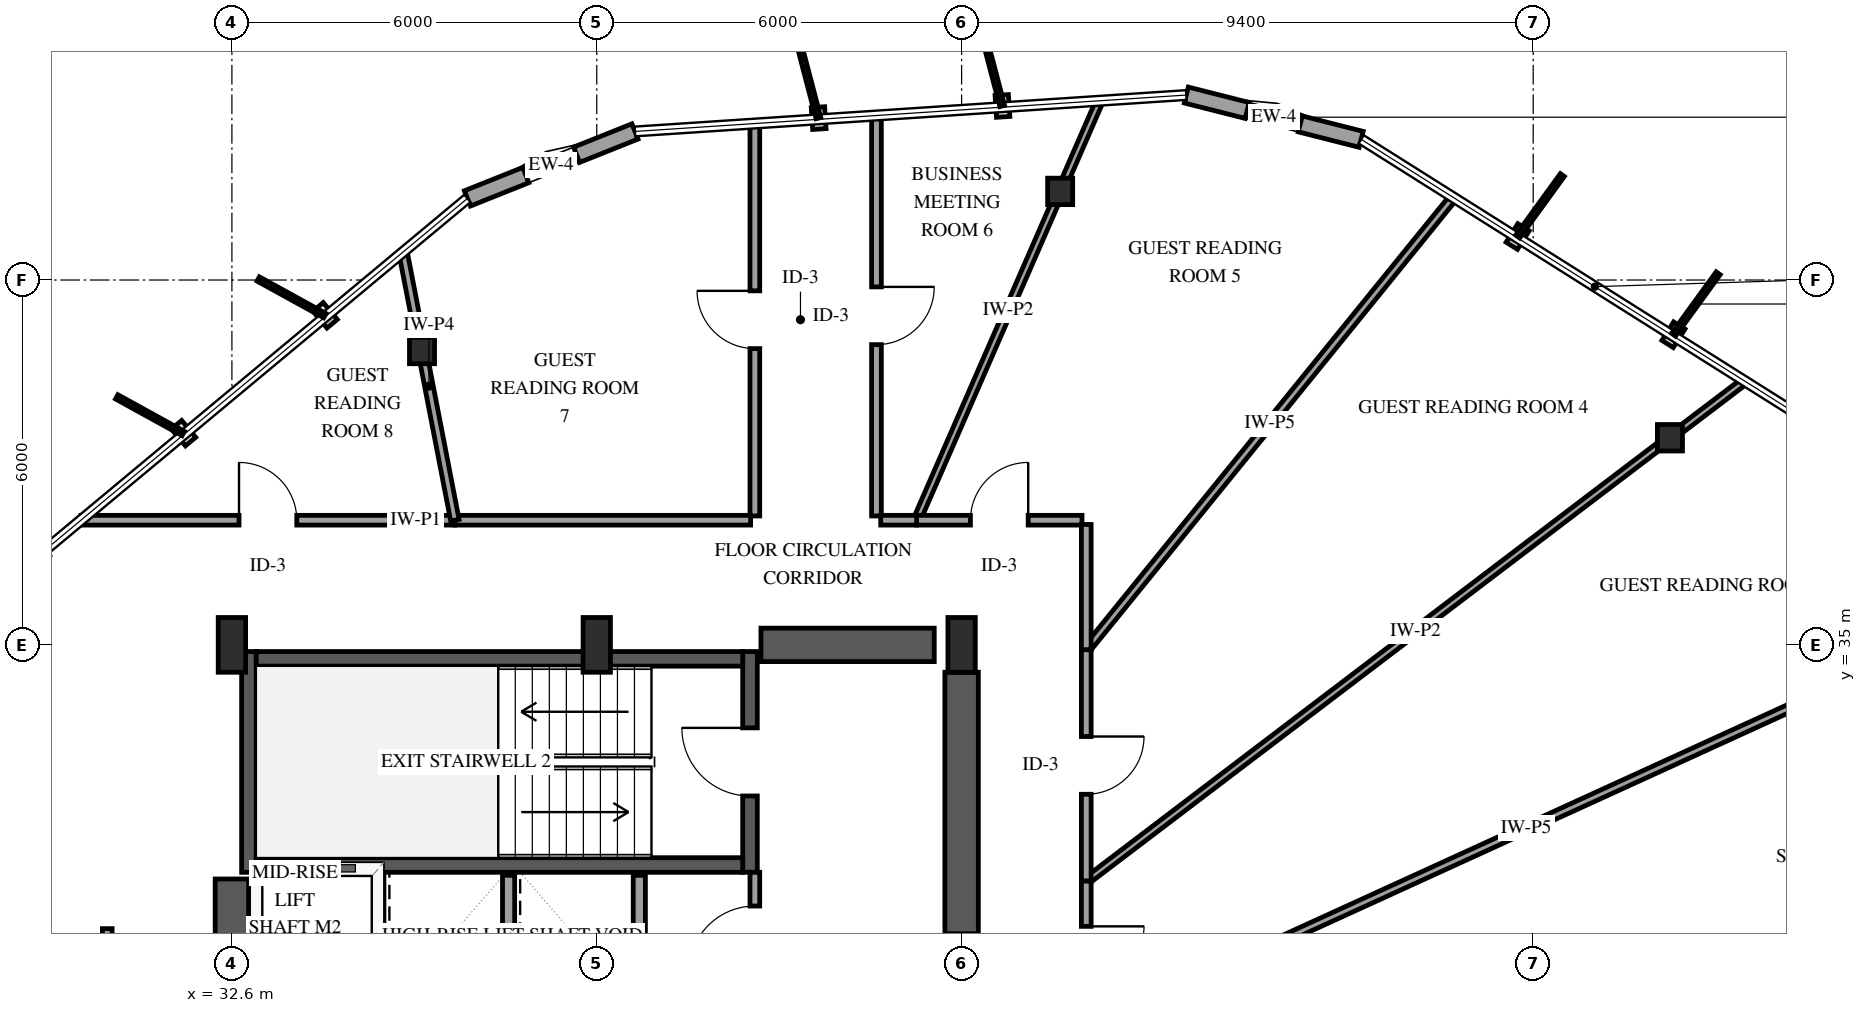
"""IFC4 building model, lengths in metres.
Left out: names, types, materials, properties, quantities, classifications, styles, units other than length and angle.
Written with IfcOpenShell. Run it as: python <this file> out.ifc"""

import sys

from ifc_helpers import new_model, si_unit, direction, frame, frame_2d, origin, origin_2d, place, context, subcontext, project, spatial, rectangle, i_section, extrude, element, fill, save


model = new_model("IFC4")
c1 = context("Model", 3, precision=1e-05, world=origin(), true_north=direction((0.0, 1.0)))
c2 = subcontext(c1, "Body", "Model", "MODEL_VIEW")
j1 = project(units=[si_unit("LENGTHUNIT", "METRE"), si_unit("PLANEANGLEUNIT", "RADIAN")], contexts=[c1])
p1 = place(None, origin())
s1 = spatial("IfcSite", under=j1, at=p1, CompositionType="ELEMENT")
p2 = place(p1, origin())
s2 = spatial("IfcBuilding", under=s1, at=p2, CompositionType="ELEMENT")
p3 = place(p2, frame((0.0, 0.0, 178.6)))
s3 = spatial("IfcBuildingStorey", under=s2, at=p3, CompositionType="ELEMENT", Elevation=178.6)
p4 = place(p3, frame((32.88, 31.26, 0.0), z_axis=(0.0, 0.0, 1.0), x_axis=(0.0, 1.0, 0.0)))
e1 = element("IfcWall", 1, at=p4, inside=s3, PredefinedType="SHEAR", context=c2, shape_type="SweptSolid", body=[
    extrude(rectangle(XDim=3.63, YDim=0.24, at=frame_2d((1.815, 0.0))), origin(), (0.0, 0.0, 1.0), 3.6),
])
p5 = place(p3, frame((41.12, 31.26, 0.0), z_axis=(0.0, 0.0, 1.0), x_axis=(0.0, 1.0, 0.0)))
e2 = element("IfcWall", 2, at=p5, inside=s3, PredefinedType="SHEAR", context=c2, shape_type="SweptSolid", body=[
    extrude(rectangle(XDim=3.63, YDim=0.24, at=frame_2d((1.815, 0.0))), origin(), (0.0, 0.0, 1.0), 3.6),
])
p6 = place(p5, frame((1.255, 0.0, 0.0)))
e3 = element("IfcOpeningElement", 3, at=p6, cuts=e2, PredefinedType="OPENING", context=c2, shape_type="SweptSolid", body=[
    extrude(rectangle(XDim=1.12, YDim=2.15, at=frame_2d((0.56, 1.075))), frame((0.0, 0.13, 0.0), z_axis=(0.0, -1.0, 0.0), x_axis=(1.0, 0.0, 0.0)), (0.0, 0.0, 1.0), 0.26),
])
for number, where, z_axis, x_axis in (
    (4, (33.0, 31.38, 0.0), (0.0, 0.0, 1.0), (1.0, 0.0, 0.0)),
    (5, (33.0, 34.77, 0.0), (0.0, 0.0, 1.0), (1.0, 0.0, 0.0)),
):
    element("IfcWall", number, at=place(p3, frame(where, z_axis=z_axis, x_axis=x_axis)), inside=s3, PredefinedType="SHEAR", context=c2, shape_type="SweptSolid", body=[
        extrude(rectangle(XDim=8.0, YDim=0.24, at=frame_2d((4.0, 0.0))), origin(), (0.0, 0.0, 1.0), 3.6),
    ])
p7 = place(p3, frame((32.6, 18.85, 0.0), z_axis=(0.0, 0.0, 1.0), x_axis=(0.0, 1.0, 0.0)))
e6 = element("IfcWall", 6, at=p7, inside=s3, PredefinedType="SHEAR", context=c2, shape_type="SweptSolid", body=[
    extrude(rectangle(XDim=12.3, YDim=0.55, at=frame_2d((6.15, 0.0))), origin(), (0.0, 0.0, 1.0), 3.6),
])
p8 = place(p3, frame((41.3, 35.0, 0.0), z_axis=(0.0, 0.0, 1.0), x_axis=(1.0, 0.0, 0.0)))
e7 = element("IfcWall", 7, at=p8, inside=s3, PredefinedType="SHEAR", context=c2, shape_type="SweptSolid", body=[
    extrude(rectangle(XDim=2.85, YDim=0.55, at=frame_2d((1.425, 0.0))), origin(), (0.0, 0.0, 1.0), 3.6),
])
p9 = place(p3, frame((44.6, 29.8, 0.0), z_axis=(0.0, 0.0, 1.0), x_axis=(0.0, 1.0, 0.0)))
e8 = element("IfcWall", 8, at=p9, inside=s3, PredefinedType="SHEAR", context=c2, shape_type="SweptSolid", body=[
    extrude(rectangle(XDim=4.75, YDim=0.55, at=frame_2d((2.375, 0.0))), origin(), (0.0, 0.0, 1.0), 3.6),
])
for number, where, z_axis, x_axis in (
    (9, (32.6, 35.0, 0.0), (0.0, 0.0, 1.0), (1.0, 0.0, 0.0)),
    (10, (38.6, 35.0, 0.0), (0.0, 0.0, 1.0), (1.0, 0.0, 0.0)),
    (11, (44.6, 35.0, 0.0), (0.0, 0.0, 1.0), (1.0, 0.0, 0.0)),
):
    element("IfcColumn", number, at=place(p3, frame(where, z_axis=z_axis, x_axis=x_axis)), inside=s3, PredefinedType="PILASTER", context=c2, shape_type="SweptSolid", body=[
        extrude(rectangle(XDim=0.45, YDim=0.9, at=origin_2d()), origin(), (0.0, 0.0, 1.0), 3.6),
    ])
for number, where, z_axis, x_axis in (
    (12, (56.249, 38.406, 0.0), (0.0, 0.0, 1.0), (1.0, 0.0, 0.0)),
    (13, (46.221, 42.458, 0.0), (0.0, 0.0, 1.0), (1.0, 0.0, 0.0)),
    (14, (35.726, 39.841, 0.0), (0.0, 0.0, 1.0), (1.0, 0.0, 0.0)),
):
    element("IfcColumn", number, at=place(p3, frame(where, z_axis=z_axis, x_axis=x_axis)), inside=s3, PredefinedType="COLUMN", context=c2, shape_type="SweptSolid", body=[
        extrude(i_section(OverallWidth=0.412, OverallDepth=0.435, WebThickness=0.036, FlangeThickness=0.057, FilletRadius=0.038, at=origin_2d()), origin(), (0.0, 0.0, 1.0), 3.6),
    ])
p10 = place(p3, frame((51.171, 43.313, 0.0), z_axis=(0.0, 0.0, 1.0), x_axis=(-0.969353138007, 0.245671516128, 0.0)))
e15 = element("IfcWall", 15, at=p10, inside=s3, PredefinedType="SOLIDWALL", context=c2, shape_type="SweptSolid", body=[
    extrude(rectangle(XDim=2.966, YDim=0.27, at=frame_2d((1.483, 0.0))), origin(), (0.0, 0.0, 1.0), 2.679),
])
p11 = place(p10, frame((1.033, 0.0, 0.75)))
e16 = element("IfcOpeningElement", 16, at=p11, cuts=e15, PredefinedType="OPENING", context=c2, shape_type="SweptSolid", body=[
    extrude(rectangle(XDim=0.9, YDim=1.5, at=frame_2d((0.45, 0.75))), frame((0.0, 0.145, 0.0), z_axis=(0.0, -1.0, 0.0), x_axis=(1.0, 0.0, 0.0)), (0.0, 0.0, 1.0), 0.29),
])
p12 = place(p3, frame((39.228, 43.443, 0.0), z_axis=(0.0, 0.0, 1.0), x_axis=(-0.928595836805, -0.371092672884, 0.0)))
e17 = element("IfcWall", 17, at=p12, inside=s3, PredefinedType="SOLIDWALL", context=c2, shape_type="SweptSolid", body=[
    extrude(rectangle(XDim=2.967, YDim=0.27, at=frame_2d((1.483, 0.0))), origin(), (0.0, 0.0, 1.0), 2.679),
])
p13 = place(p12, frame((1.033, 0.0, 0.75)))
e18 = element("IfcOpeningElement", 18, at=p13, cuts=e17, PredefinedType="OPENING", context=c2, shape_type="SweptSolid", body=[
    extrude(rectangle(XDim=0.9, YDim=1.5, at=frame_2d((0.45, 0.75))), frame((0.0, 0.145, 0.0), z_axis=(0.0, -1.0, 0.0), x_axis=(1.0, 0.0, 0.0)), (0.0, 0.0, 1.0), 0.29),
])
for number, where, z_axis, x_axis in (
    (19, (35.0, 29.11, 0.0), (0.0, 0.0, 1.0), (0.0, 1.0, 0.0)),
    (20, (37.15, 29.11, 0.0), (0.0, 0.0, 1.0), (0.0, 1.0, 0.0)),
    (21, (39.3, 29.11, 0.0), (0.0, 0.0, 1.0), (0.0, 1.0, 0.0)),
):
    element("IfcWall", number, at=place(p3, frame(where, z_axis=z_axis, x_axis=x_axis)), inside=s3, PredefinedType="SOLIDWALL", context=c2, shape_type="SweptSolid", body=[
        extrude(rectangle(XDim=2.1, YDim=0.2, at=frame_2d((1.05, 0.0))), origin(), (0.0, 0.0, 1.0), 3.3),
    ])
p14 = place(p3, frame((46.65, 28.677, 0.0), z_axis=(0.0, 0.0, 1.0), x_axis=(0.909584224625, 0.415519600395, 0.0)))
e22 = element("IfcWall", 22, at=p14, inside=s3, PredefinedType="PARTITIONING", context=c2, shape_type="SweptSolid", body=[
    extrude(rectangle(XDim=15.905, YDim=0.13, at=frame_2d((7.953, 0.0))), origin(), (0.0, 0.0, 1.0), 3.3),
])
p15 = place(p3, frame((46.65, 31.115, 0.0), z_axis=(0.0, 0.0, 1.0), x_axis=(0.796322023961, 0.60487290744, 0.0)))
e23 = element("IfcWall", 23, at=p15, inside=s3, PredefinedType="PARTITIONING", context=c2, shape_type="SweptSolid", body=[
    extrude(rectangle(XDim=13.596, YDim=0.12, at=frame_2d((6.798, 0.0))), origin(), (0.0, 0.0, 1.0), 3.3),
])
p16 = place(p3, frame((46.65, 34.921, 0.0), z_axis=(0.0, 0.0, 1.0), x_axis=(0.630137710879, 0.776483396685, 0.0)))
e24 = element("IfcWall", 24, at=p16, inside=s3, PredefinedType="PARTITIONING", context=c2, shape_type="SweptSolid", body=[
    extrude(rectangle(XDim=9.579, YDim=0.13, at=frame_2d((4.79, 0.0))), origin(), (0.0, 0.0, 1.0), 3.3),
])
p17 = place(p3, frame((43.86, 37.05, 0.0), z_axis=(0.0, 0.0, 1.0), x_axis=(0.400052953887, 0.916492026199, 0.0)))
e25 = element("IfcWall", 25, at=p17, inside=s3, PredefinedType="PARTITIONING", context=c2, shape_type="SweptSolid", body=[
    extrude(rectangle(XDim=7.526, YDim=0.12, at=frame_2d((3.763, 0.0))), origin(), (0.0, 0.0, 1.0), 2.595),
])
p18 = place(p3, frame((43.2, 43.705, 0.0), z_axis=(0.0, 0.0, 1.0), x_axis=(0.0, -1.0, 0.0)))
e26 = element("IfcWall", 26, at=p18, inside=s3, PredefinedType="PARTITIONING", context=c2, shape_type="SweptSolid", body=[
    extrude(rectangle(XDim=6.585, YDim=0.16, at=frame_2d((3.292, 0.0))), origin(), (0.0, 0.0, 1.0), 3.3),
])
p19 = place(p18, frame((2.818, 0.0, 0.0)))
e27 = element("IfcOpeningElement", 27, at=p19, cuts=e26, PredefinedType="OPENING", context=c2, shape_type="SweptSolid", body=[
    extrude(rectangle(XDim=0.95, YDim=2.15, at=frame_2d((0.475, 1.075))), frame((0.0, 0.09, 0.0), z_axis=(0.0, -1.0, 0.0), x_axis=(1.0, 0.0, 0.0)), (0.0, 0.0, 1.0), 0.18),
])
p20 = place(p3, frame((41.2, 37.12, 0.0), z_axis=(0.0, 0.0, 1.0), x_axis=(0.0, 1.0, 0.0)))
e28 = element("IfcWall", 28, at=p20, inside=s3, PredefinedType="PARTITIONING", context=c2, shape_type="SweptSolid", body=[
    extrude(rectangle(XDim=6.453, YDim=0.16, at=frame_2d((3.227, 0.0))), origin(), (0.0, 0.0, 1.0), 3.3),
])
p21 = place(p20, frame((2.752, 0.0, 0.0)))
e29 = element("IfcOpeningElement", 29, at=p21, cuts=e28, PredefinedType="OPENING", context=c2, shape_type="SweptSolid", body=[
    extrude(rectangle(XDim=0.95, YDim=2.15, at=frame_2d((0.475, 1.075))), frame((0.0, 0.09, 0.0), z_axis=(0.0, -1.0, 0.0), x_axis=(1.0, 0.0, 0.0)), (0.0, 0.0, 1.0), 0.18),
])
p22 = place(p3, frame((30.117, 37.05, 0.0), z_axis=(0.0, 0.0, 1.0), x_axis=(1.0, 0.0, 0.0)))
e30 = element("IfcWall", 30, at=p22, inside=s3, PredefinedType="PARTITIONING", context=c2, shape_type="SweptSolid", body=[
    extrude(rectangle(XDim=6.15, YDim=0.16, at=frame_2d((3.075, 0.0))), origin(), (0.0, 0.0, 1.0), 3.3),
])
p23 = place(p22, frame((2.6, 0.0, 0.0)))
e31 = element("IfcOpeningElement", 31, at=p23, cuts=e30, PredefinedType="OPENING", context=c2, shape_type="SweptSolid", body=[
    extrude(rectangle(XDim=0.95, YDim=2.15, at=frame_2d((0.475, 1.075))), frame((0.0, 0.09, 0.0), z_axis=(0.0, -1.0, 0.0), x_axis=(1.0, 0.0, 0.0)), (0.0, 0.0, 1.0), 0.18),
])
p24 = place(p3, frame((36.267, 37.05, 0.0), z_axis=(0.0, 0.0, 1.0), x_axis=(1.0, 0.0, 0.0)))
e32 = element("IfcWall", 32, at=p24, inside=s3, PredefinedType="PARTITIONING", context=c2, shape_type="SweptSolid", body=[
    extrude(rectangle(XDim=4.863, YDim=0.16, at=frame_2d((2.431, 0.0))), origin(), (0.0, 0.0, 1.0), 3.3),
])
p25 = place(p3, frame((36.267, 37.05, 0.0), z_axis=(0.0, 0.0, 1.0), x_axis=(-0.190163893375, 0.98175235862, 0.0)))
e33 = element("IfcWall", 33, at=p25, inside=s3, PredefinedType="PARTITIONING", context=c2, shape_type="SweptSolid", body=[
    extrude(rectangle(XDim=4.491, YDim=0.14, at=frame_2d((2.246, 0.0))), origin(), (0.0, 0.0, 1.0), 2.595),
])
p26 = place(p3, frame((46.65, 34.921, 0.0), z_axis=(0.0, 0.0, 1.0), x_axis=(0.0, -1.0, 0.0)))
e34 = element("IfcWall", 34, at=p26, inside=s3, PredefinedType="PARTITIONING", context=c2, shape_type="SweptSolid", body=[
    extrude(rectangle(XDim=3.806, YDim=0.16, at=frame_2d((1.903, 0.0))), origin(), (0.0, 0.0, 1.0), 3.3),
])
p27 = place(p26, frame((1.428, 0.0, 0.0)))
e35 = element("IfcOpeningElement", 35, at=p27, cuts=e34, PredefinedType="OPENING", context=c2, shape_type="SweptSolid", body=[
    extrude(rectangle(XDim=0.95, YDim=2.15, at=frame_2d((0.475, 1.075))), frame((0.0, 0.09, 0.0), z_axis=(0.0, -1.0, 0.0), x_axis=(1.0, 0.0, 0.0)), (0.0, 0.0, 1.0), 0.18),
])
p28 = place(p3, frame((43.86, 37.05, 0.0), z_axis=(0.0, 0.0, 1.0), x_axis=(1.0, 0.0, 0.0)))
e36 = element("IfcWall", 36, at=p28, inside=s3, PredefinedType="PARTITIONING", context=c2, shape_type="SweptSolid", body=[
    extrude(rectangle(XDim=2.72, YDim=0.16, at=frame_2d((1.36, 0.0))), origin(), (0.0, 0.0, 1.0), 3.3),
])
p29 = place(p28, frame((0.885, 0.0, 0.0)))
e37 = element("IfcOpeningElement", 37, at=p29, cuts=e36, PredefinedType="OPENING", context=c2, shape_type="SweptSolid", body=[
    extrude(rectangle(XDim=0.95, YDim=2.15, at=frame_2d((0.475, 1.075))), frame((0.0, 0.09, 0.0), z_axis=(0.0, -1.0, 0.0), x_axis=(1.0, 0.0, 0.0)), (0.0, 0.0, 1.0), 0.18),
])
p30 = place(p3, frame((46.65, 31.115, 0.0), z_axis=(0.0, 0.0, 1.0), x_axis=(0.0, -1.0, 0.0)))
e38 = element("IfcWall", 38, at=p30, inside=s3, PredefinedType="PARTITIONING", context=c2, shape_type="SweptSolid", body=[
    extrude(rectangle(XDim=2.438, YDim=0.16, at=frame_2d((1.219, 0.0))), origin(), (0.0, 0.0, 1.0), 3.3),
])
p31 = place(p30, frame((0.744, 0.0, 0.0)))
e39 = element("IfcOpeningElement", 39, at=p31, cuts=e38, PredefinedType="OPENING", context=c2, shape_type="SweptSolid", body=[
    extrude(rectangle(XDim=0.95, YDim=2.15, at=frame_2d((0.475, 1.075))), frame((0.0, 0.09, 0.0), z_axis=(0.0, -1.0, 0.0), x_axis=(1.0, 0.0, 0.0)), (0.0, 0.0, 1.0), 0.18),
])
p32 = place(p3, frame((41.2, 29.07, 0.0), z_axis=(0.0, 0.0, 1.0), x_axis=(0.0, 1.0, 0.0)))
e40 = element("IfcWall", 40, at=p32, inside=s3, PredefinedType="PARTITIONING", context=c2, shape_type="SweptSolid", body=[
    extrude(rectangle(XDim=2.19, YDim=0.16, at=frame_2d((1.095, 0.0))), origin(), (0.0, 0.0, 1.0), 3.3),
])
p33 = place(p32, frame((0.555, 0.0, 0.0)))
e41 = element("IfcOpeningElement", 41, at=p33, cuts=e40, PredefinedType="OPENING", context=c2, shape_type="SweptSolid", body=[
    extrude(rectangle(XDim=1.08, YDim=2.15, at=frame_2d((0.54, 1.075))), frame((0.0, 0.09, 0.0), z_axis=(0.0, -1.0, 0.0), x_axis=(1.0, 0.0, 0.0)), (0.0, 0.0, 1.0), 0.18),
])
p34 = place(p3, frame((46.65, 36.98, 0.0), z_axis=(0.0, 0.0, 1.0), x_axis=(0.0, -1.0, 0.0)))
e42 = element("IfcWall", 42, at=p34, inside=s3, PredefinedType="PARTITIONING", context=c2, shape_type="SweptSolid", body=[
    extrude(rectangle(XDim=2.059, YDim=0.16, at=frame_2d((1.03, 0.0))), origin(), (0.0, 0.0, 1.0), 3.3),
])
p35 = place(p3, frame((43.27, 37.05, 0.0), z_axis=(0.0, 0.0, 1.0), x_axis=(1.0, 0.0, 0.0)))
e43 = element("IfcWall", 43, at=p35, inside=s3, PredefinedType="PARTITIONING", context=c2, shape_type="SweptSolid", body=[
    extrude(rectangle(XDim=0.59, YDim=0.16, at=frame_2d((0.295, 0.0))), origin(), (0.0, 0.0, 1.0), 3.3),
])
p36 = place(p3, frame((30.55, 21.778, 0.0), z_axis=(0.0, 0.0, 1.0), x_axis=(0.0, 1.0, 0.0)))
e44 = element("IfcWall", 44, at=p36, inside=s3, PredefinedType="PARTITIONING", context=c2, shape_type="SweptSolid", body=[
    extrude(rectangle(XDim=8.555, YDim=0.16, at=frame_2d((4.277, 0.0))), origin(), (0.0, 0.0, 1.0), 3.3),
])
p37 = place(p11, origin())
e45 = element("IfcWindow", 45, at=p37, inside=s3, PartitioningType="SINGLE_PANEL", PredefinedType="WINDOW", context=c2, shape_type="SweptSolid", body=[
    extrude(rectangle(XDim=0.9, YDim=1.5, at=frame_2d((0.45, 0.75))), frame((0.0, 0.03, 0.0), z_axis=(0.0, -1.0, 0.0), x_axis=(1.0, 0.0, 0.0)), (0.0, 0.0, 1.0), 0.06),
])
fill(e16, e45)
p38 = place(p13, origin())
e46 = element("IfcWindow", 46, at=p38, inside=s3, PartitioningType="SINGLE_PANEL", PredefinedType="WINDOW", context=c2, shape_type="SweptSolid", body=[
    extrude(rectangle(XDim=0.9, YDim=1.5, at=frame_2d((0.45, 0.75))), frame((0.0, 0.03, 0.0), z_axis=(0.0, -1.0, 0.0), x_axis=(1.0, 0.0, 0.0)), (0.0, 0.0, 1.0), 0.06),
])
fill(e18, e46)
p39 = place(p6, origin())
e47 = element("IfcDoor", 47, at=p39, inside=s3, OperationType="SINGLE_SWING_RIGHT", PredefinedType="DOOR", context=c2, shape_type="SweptSolid", body=[
    extrude(rectangle(XDim=1.12, YDim=2.15, at=frame_2d((0.56, 1.075))), frame((0.0, 0.025, 0.0), z_axis=(0.0, -1.0, 0.0), x_axis=(1.0, 0.0, 0.0)), (0.0, 0.0, 1.0), 0.05),
])
fill(e3, e47)
p40 = place(p19, origin())
e48 = element("IfcDoor", 48, at=p40, inside=s3, OperationType="SINGLE_SWING_LEFT", PredefinedType="DOOR", context=c2, shape_type="SweptSolid", body=[
    extrude(rectangle(XDim=0.95, YDim=2.15, at=frame_2d((0.475, 1.075))), frame((0.0, 0.025, 0.0), z_axis=(0.0, -1.0, 0.0), x_axis=(1.0, 0.0, 0.0)), (0.0, 0.0, 1.0), 0.05),
])
fill(e27, e48)
p41 = place(p21, origin())
e49 = element("IfcDoor", 49, at=p41, inside=s3, OperationType="SINGLE_SWING_RIGHT", PredefinedType="DOOR", context=c2, shape_type="SweptSolid", body=[
    extrude(rectangle(XDim=0.95, YDim=2.15, at=frame_2d((0.475, 1.075))), frame((0.0, 0.025, 0.0), z_axis=(0.0, -1.0, 0.0), x_axis=(1.0, 0.0, 0.0)), (0.0, 0.0, 1.0), 0.05),
])
fill(e29, e49)
p42 = place(p23, origin())
e50 = element("IfcDoor", 50, at=p42, inside=s3, OperationType="SINGLE_SWING_LEFT", PredefinedType="DOOR", context=c2, shape_type="SweptSolid", body=[
    extrude(rectangle(XDim=0.95, YDim=2.15, at=frame_2d((0.475, 1.075))), frame((0.0, 0.025, 0.0), z_axis=(0.0, -1.0, 0.0), x_axis=(1.0, 0.0, 0.0)), (0.0, 0.0, 1.0), 0.05),
])
fill(e31, e50)
p43 = place(p27, origin())
e51 = element("IfcDoor", 51, at=p43, inside=s3, OperationType="SINGLE_SWING_LEFT", PredefinedType="DOOR", context=c2, shape_type="SweptSolid", body=[
    extrude(rectangle(XDim=0.95, YDim=2.15, at=frame_2d((0.475, 1.075))), frame((0.0, 0.025, 0.0), z_axis=(0.0, -1.0, 0.0), x_axis=(1.0, 0.0, 0.0)), (0.0, 0.0, 1.0), 0.05),
])
fill(e35, e51)
p44 = place(p29, origin())
e52 = element("IfcDoor", 52, at=p44, inside=s3, OperationType="SINGLE_SWING_RIGHT", PredefinedType="DOOR", context=c2, shape_type="SweptSolid", body=[
    extrude(rectangle(XDim=0.95, YDim=2.15, at=frame_2d((0.475, 1.075))), frame((0.0, 0.025, 0.0), z_axis=(0.0, -1.0, 0.0), x_axis=(1.0, 0.0, 0.0)), (0.0, 0.0, 1.0), 0.05),
])
fill(e37, e52)
p45 = place(p31, origin())
e53 = element("IfcDoor", 53, at=p45, inside=s3, OperationType="SINGLE_SWING_LEFT", PredefinedType="DOOR", context=c2, shape_type="SweptSolid", body=[
    extrude(rectangle(XDim=0.95, YDim=2.15, at=frame_2d((0.475, 1.075))), frame((0.0, 0.025, 0.0), z_axis=(0.0, -1.0, 0.0), x_axis=(1.0, 0.0, 0.0)), (0.0, 0.0, 1.0), 0.05),
])
fill(e39, e53)
p46 = place(p33, origin())
e54 = element("IfcDoor", 54, at=p46, inside=s3, OperationType="SINGLE_SWING_LEFT", PredefinedType="DOOR", context=c2, shape_type="SweptSolid", body=[
    extrude(rectangle(XDim=1.08, YDim=2.15, at=frame_2d((0.54, 1.075))), frame((0.0, 0.025, 0.0), z_axis=(0.0, -1.0, 0.0), x_axis=(1.0, 0.0, 0.0)), (0.0, 0.0, 1.0), 0.05),
])
fill(e41, e54)
save(model, sys.argv[1])
